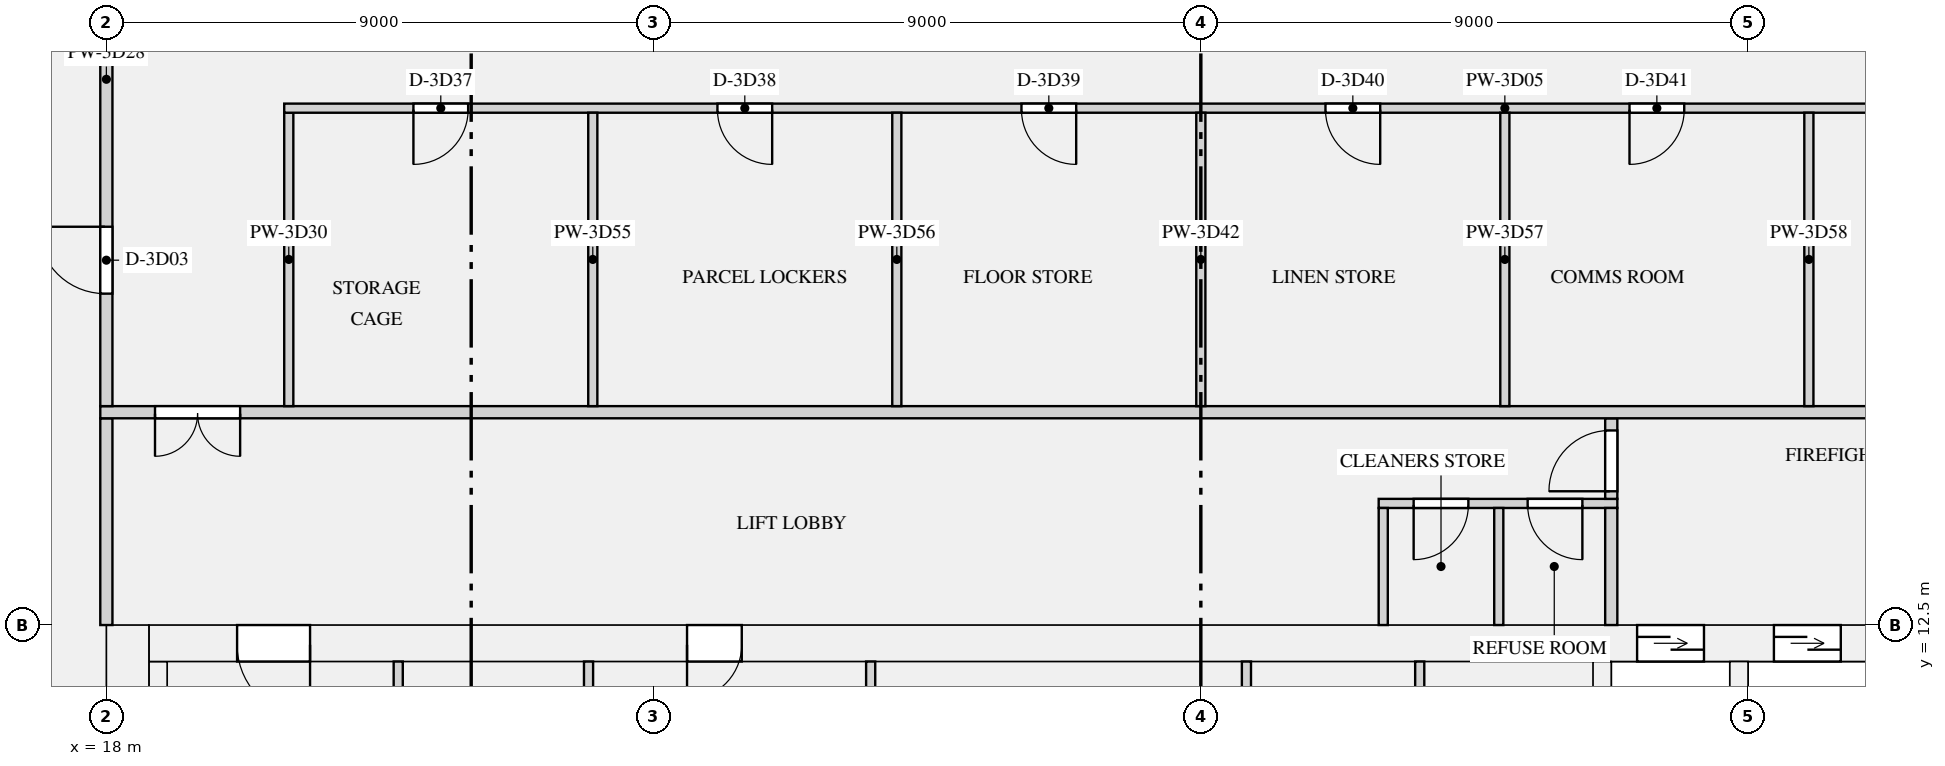
"""IFC4 building model, lengths in metres.
Left out: names, types, materials, properties, quantities, classifications, styles, units other than length and angle.
Written with IfcOpenShell. Run it as: python <this file> out.ifc"""

import sys

from ifc_helpers import new_model, si_unit, direction, frame, frame_2d, origin, place, context, subcontext, project, spatial, rectangle, extrude, element, fill, save


model = new_model("IFC4")
c1 = context("Model", 3, precision=1e-05, world=origin(), true_north=direction((0.0, 1.0)))
c2 = subcontext(c1, "Body", "Model", "MODEL_VIEW")
j1 = project(units=[si_unit("LENGTHUNIT", "METRE"), si_unit("PLANEANGLEUNIT", "RADIAN")], contexts=[c1])
p1 = place(None, origin())
s1 = spatial("IfcSite", under=j1, at=p1, CompositionType="ELEMENT")
p2 = place(p1, origin())
s2 = spatial("IfcBuilding", under=s1, at=p2, CompositionType="ELEMENT")
p3 = place(p2, frame((0.0, 0.0, 166.5)))
s3 = spatial("IfcBuildingStorey", under=s2, at=p3, CompositionType="ELEMENT", Elevation=166.5)
p4 = place(p3, frame((18.35, 0.0, 0.0), z_axis=(0.0, 0.0, 1.0), x_axis=(0.0, 1.0, 0.0)))
e1 = element("IfcWall", 1, at=p4, inside=s3, PredefinedType="SHEAR", context=c2, shape_type="SweptSolid", body=[
    extrude(rectangle(XDim=12.5, YDim=0.7, at=frame_2d((6.25, 0.0))), origin(), (0.0, 0.0, 1.0), 3.15),
])
p5 = place(p3, frame((18.7, 12.2, 0.0), z_axis=(0.0, 0.0, 1.0), x_axis=(1.0, 0.0, 0.0)))
e2 = element("IfcWall", 2, at=p5, inside=s3, PredefinedType="SHEAR", context=c2, shape_type="SweptSolid", body=[
    extrude(rectangle(XDim=34.6, YDim=0.6, at=frame_2d((17.3, 0.0))), origin(), (0.0, 0.0, 1.0), 3.15),
])
p6 = place(p5, frame((24.475, 0.0, 0.0)))
e3 = element("IfcOpeningElement", 3, at=p6, cuts=e2, PredefinedType="OPENING", context=c2, shape_type="SweptSolid", body=[
    extrude(rectangle(XDim=1.1, YDim=2.1, at=frame_2d((0.55, 1.05))), frame((0.0, 0.31, 0.0), z_axis=(0.0, -1.0, 0.0), x_axis=(1.0, 0.0, 0.0)), (0.0, 0.0, 1.0), 0.62),
])
p7 = place(p5, frame((26.725, 0.0, 0.0)))
e4 = element("IfcOpeningElement", 4, at=p7, cuts=e2, PredefinedType="OPENING", context=c2, shape_type="SweptSolid", body=[
    extrude(rectangle(XDim=1.1, YDim=2.1, at=frame_2d((0.55, 1.05))), frame((0.0, 0.31, 0.0), z_axis=(0.0, -1.0, 0.0), x_axis=(1.0, 0.0, 0.0)), (0.0, 0.0, 1.0), 0.62),
])
p8 = place(p5, frame((28.975, 0.0, 0.0)))
e5 = element("IfcOpeningElement", 5, at=p8, cuts=e2, PredefinedType="OPENING", context=c2, shape_type="SweptSolid", body=[
    extrude(rectangle(XDim=1.1, YDim=2.1, at=frame_2d((0.55, 1.05))), frame((0.0, 0.31, 0.0), z_axis=(0.0, -1.0, 0.0), x_axis=(1.0, 0.0, 0.0)), (0.0, 0.0, 1.0), 0.62),
])
p9 = place(p5, frame((8.85, 0.0, 0.0)))
e6 = element("IfcOpeningElement", 6, at=p9, cuts=e2, PredefinedType="OPENING", context=c2, shape_type="SweptSolid", body=[
    extrude(rectangle(XDim=0.9, YDim=2.1, at=frame_2d((0.45, 1.05))), frame((0.0, 0.31, 0.0), z_axis=(0.0, -1.0, 0.0), x_axis=(1.0, 0.0, 0.0)), (0.0, 0.0, 1.0), 0.62),
])
p10 = place(p5, frame((1.45, 0.0, 0.0)))
e7 = element("IfcOpeningElement", 7, at=p10, cuts=e2, PredefinedType="OPENING", context=c2, shape_type="SweptSolid", body=[
    extrude(rectangle(XDim=1.2, YDim=2.1, at=frame_2d((0.6, 1.05))), frame((0.0, 0.31, 0.0), z_axis=(0.0, -1.0, 0.0), x_axis=(1.0, 0.0, 0.0)), (0.0, 0.0, 1.0), 0.62),
])
p11 = place(p5, frame((31.95, 0.0, 0.0)))
e8 = element("IfcOpeningElement", 8, at=p11, cuts=e2, PredefinedType="OPENING", context=c2, shape_type="SweptSolid", body=[
    extrude(rectangle(XDim=1.2, YDim=2.1, at=frame_2d((0.6, 1.05))), frame((0.0, 0.31, 0.0), z_axis=(0.0, -1.0, 0.0), x_axis=(1.0, 0.0, 0.0)), (0.0, 0.0, 1.0), 0.62),
])
p12 = place(p3, frame((18.85, 1.0, 0.0), z_axis=(0.0, 0.0, 1.0), x_axis=(0.0, 1.0, 0.0)))
e9 = element("IfcWall", 9, at=p12, inside=s3, PredefinedType="SHEAR", context=c2, shape_type="SweptSolid", body=[
    extrude(rectangle(XDim=10.9, YDim=0.3, at=frame_2d((5.45, 0.0))), origin(), (0.0, 0.0, 1.0), 3.15),
])
for number, where, z_axis, x_axis in (
    (10, (42.6, 8.25, 0.0), (0.0, 0.0, 1.0), (0.0, 1.0, 0.0)),
    (11, (44.85, 8.25, 0.0), (0.0, 0.0, 1.0), (0.0, 1.0, 0.0)),
):
    element("IfcWall", number, at=place(p3, frame(where, z_axis=z_axis, x_axis=x_axis)), inside=s3, PredefinedType="SHEAR", context=c2, shape_type="SweptSolid", body=[
        extrude(rectangle(XDim=3.65, YDim=0.3, at=frame_2d((1.825, 0.0))), origin(), (0.0, 0.0, 1.0), 3.15),
    ])
p13 = place(p3, frame((38.925, 14.5, 0.0), z_axis=(0.0, 0.0, 1.0), x_axis=(1.0, 0.0, 0.0)))
e12 = element("IfcWall", 12, at=p13, inside=s3, PredefinedType="PARTITIONING", context=c2, shape_type="SweptSolid", body=[
    extrude(rectangle(XDim=3.925, YDim=0.15, at=frame_2d((1.962, 0.0))), origin(), (0.0, 0.0, 1.0), 2.83),
])
p14 = place(p13, frame((0.575, 0.0, 0.0)))
e13 = element("IfcOpeningElement", 13, at=p14, cuts=e12, PredefinedType="OPENING", context=c2, shape_type="SweptSolid", body=[
    extrude(rectangle(XDim=0.9, YDim=2.1, at=frame_2d((0.45, 1.05))), frame((0.0, 0.085, 0.0), z_axis=(0.0, -1.0, 0.0), x_axis=(1.0, 0.0, 0.0)), (0.0, 0.0, 1.0), 0.17),
])
p15 = place(p13, frame((2.45, 0.0, 0.0)))
e14 = element("IfcOpeningElement", 14, at=p15, cuts=e12, PredefinedType="OPENING", context=c2, shape_type="SweptSolid", body=[
    extrude(rectangle(XDim=0.9, YDim=2.1, at=frame_2d((0.45, 1.05))), frame((0.0, 0.085, 0.0), z_axis=(0.0, -1.0, 0.0), x_axis=(1.0, 0.0, 0.0)), (0.0, 0.0, 1.0), 0.17),
])
for number, where, z_axis, x_axis in (
    (15, (22.8, 6.725, 0.0), (0.0, 0.0, 1.0), (0.0, 1.0, 0.0)),
    (16, (36.75, 6.725, 0.0), (0.0, 0.0, 1.0), (0.0, 1.0, 0.0)),
    (17, (39.6, 6.725, 0.0), (0.0, 0.0, 1.0), (0.0, 1.0, 0.0)),
):
    element("IfcWall", number, at=place(p3, frame(where, z_axis=z_axis, x_axis=x_axis)), inside=s3, PredefinedType="PARTITIONING", context=c2, shape_type="SweptSolid", body=[
        extrude(rectangle(XDim=5.175, YDim=0.15, at=frame_2d((2.587, 0.0))), origin(), (0.0, 0.0, 1.0), 2.83),
    ])
for number, where, z_axis, x_axis in (
    (18, (25.93, 9.805, 0.0), (0.0, 0.0, 1.0), (0.0, 1.0, 0.0)),
    (19, (30.57, 9.805, 0.0), (0.0, 0.0, 1.0), (0.0, 1.0, 0.0)),
):
    element("IfcWall", number, at=place(p3, frame(where, z_axis=z_axis, x_axis=x_axis)), inside=s3, PredefinedType="PARTITIONING", context=c2, shape_type="SweptSolid", body=[
        extrude(rectangle(XDim=2.095, YDim=0.15, at=frame_2d((1.047, 0.0))), origin(), (0.0, 0.0, 1.0), 2.83),
    ])
p16 = place(p3, frame((18.0, 12.5, 0.0), z_axis=(0.0, 0.0, 1.0), x_axis=(0.0, 1.0, 0.0)))
e20 = element("IfcWall", 20, at=p16, inside=s3, PredefinedType="PARTITIONING", context=c2, shape_type="SweptSolid", body=[
    extrude(rectangle(XDim=3.4, YDim=0.2, at=frame_2d((1.7, 0.0))), origin(), (0.0, 0.0, 1.0), 2.83),
])
for number, where, z_axis, x_axis in (
    (21, (39.0, 12.5, 0.0), (0.0, 0.0, 1.0), (0.0, 1.0, 0.0)),
    (22, (40.9, 12.5, 0.0), (0.0, 0.0, 1.0), (0.0, 1.0, 0.0)),
):
    element("IfcWall", number, at=place(p3, frame(where, z_axis=z_axis, x_axis=x_axis)), inside=s3, PredefinedType="PARTITIONING", context=c2, shape_type="SweptSolid", body=[
        extrude(rectangle(XDim=1.925, YDim=0.15, at=frame_2d((0.962, 0.0))), origin(), (0.0, 0.0, 1.0), 2.83),
    ])
p17 = place(p3, frame((42.75, 12.5, 0.0), z_axis=(0.0, 0.0, 1.0), x_axis=(0.0, 1.0, 0.0)))
e23 = element("IfcWall", 23, at=p17, inside=s3, PredefinedType="PARTITIONING", context=c2, shape_type="SweptSolid", body=[
    extrude(rectangle(XDim=1.925, YDim=0.2, at=frame_2d((0.962, 0.0))), origin(), (0.0, 0.0, 1.0), 2.83),
])
p18 = place(p3, frame((42.75, 14.575, 0.0), z_axis=(0.0, 0.0, 1.0), x_axis=(0.0, 1.0, 0.0)))
e24 = element("IfcWall", 24, at=p18, inside=s3, PredefinedType="PARTITIONING", context=c2, shape_type="SweptSolid", body=[
    extrude(rectangle(XDim=1.325, YDim=0.2, at=frame_2d((0.663, 0.0))), origin(), (0.0, 0.0, 1.0), 2.83),
])
p19 = place(p18, frame((0.125, 0.0, 0.0)))
e25 = element("IfcOpeningElement", 25, at=p19, cuts=e24, PredefinedType="OPENING", context=c2, shape_type="SweptSolid", body=[
    extrude(rectangle(XDim=1.0, YDim=2.1, at=frame_2d((0.5, 1.05))), frame((0.0, 0.11, 0.0), z_axis=(0.0, -1.0, 0.0), x_axis=(1.0, 0.0, 0.0)), (0.0, 0.0, 1.0), 0.22),
])
p20 = place(p3, frame((20.925, 21.0, 0.0), z_axis=(0.0, 0.0, 1.0), x_axis=(1.0, 0.0, 0.0)))
e26 = element("IfcWall", 26, at=p20, inside=s3, PredefinedType="PARTITIONING", context=c2, shape_type="SweptSolid", body=[
    extrude(rectangle(XDim=30.15, YDim=0.15, at=frame_2d((15.075, 0.0))), origin(), (0.0, 0.0, 1.0), 2.83),
])
p21 = place(p20, frame((2.125, 0.0, 0.0)))
e27 = element("IfcOpeningElement", 27, at=p21, cuts=e26, PredefinedType="OPENING", context=c2, shape_type="SweptSolid", body=[
    extrude(rectangle(XDim=0.9, YDim=2.1, at=frame_2d((0.45, 1.05))), frame((0.0, 0.085, 0.0), z_axis=(0.0, -1.0, 0.0), x_axis=(1.0, 0.0, 0.0)), (0.0, 0.0, 1.0), 0.17),
])
p22 = place(p20, frame((7.125, 0.0, 0.0)))
e28 = element("IfcOpeningElement", 28, at=p22, cuts=e26, PredefinedType="OPENING", context=c2, shape_type="SweptSolid", body=[
    extrude(rectangle(XDim=0.9, YDim=2.1, at=frame_2d((0.45, 1.05))), frame((0.0, 0.085, 0.0), z_axis=(0.0, -1.0, 0.0), x_axis=(1.0, 0.0, 0.0)), (0.0, 0.0, 1.0), 0.17),
])
p23 = place(p20, frame((12.125, 0.0, 0.0)))
e29 = element("IfcOpeningElement", 29, at=p23, cuts=e26, PredefinedType="OPENING", context=c2, shape_type="SweptSolid", body=[
    extrude(rectangle(XDim=0.9, YDim=2.1, at=frame_2d((0.45, 1.05))), frame((0.0, 0.085, 0.0), z_axis=(0.0, -1.0, 0.0), x_axis=(1.0, 0.0, 0.0)), (0.0, 0.0, 1.0), 0.17),
])
p24 = place(p20, frame((17.125, 0.0, 0.0)))
e30 = element("IfcOpeningElement", 30, at=p24, cuts=e26, PredefinedType="OPENING", context=c2, shape_type="SweptSolid", body=[
    extrude(rectangle(XDim=0.9, YDim=2.1, at=frame_2d((0.45, 1.05))), frame((0.0, 0.085, 0.0), z_axis=(0.0, -1.0, 0.0), x_axis=(1.0, 0.0, 0.0)), (0.0, 0.0, 1.0), 0.17),
])
p25 = place(p20, frame((22.125, 0.0, 0.0)))
e31 = element("IfcOpeningElement", 31, at=p25, cuts=e26, PredefinedType="OPENING", context=c2, shape_type="SweptSolid", body=[
    extrude(rectangle(XDim=0.9, YDim=2.1, at=frame_2d((0.45, 1.05))), frame((0.0, 0.085, 0.0), z_axis=(0.0, -1.0, 0.0), x_axis=(1.0, 0.0, 0.0)), (0.0, 0.0, 1.0), 0.17),
])
p26 = place(p20, frame((27.125, 0.0, 0.0)))
e32 = element("IfcOpeningElement", 32, at=p26, cuts=e26, PredefinedType="OPENING", context=c2, shape_type="SweptSolid", body=[
    extrude(rectangle(XDim=0.9, YDim=2.1, at=frame_2d((0.45, 1.05))), frame((0.0, 0.085, 0.0), z_axis=(0.0, -1.0, 0.0), x_axis=(1.0, 0.0, 0.0)), (0.0, 0.0, 1.0), 0.17),
])
p27 = place(p3, frame((17.9, 16.0, 0.0), z_axis=(0.0, 0.0, 1.0), x_axis=(1.0, 0.0, 0.0)))
e33 = element("IfcWall", 33, at=p27, inside=s3, PredefinedType="PARTITIONING", context=c2, shape_type="SweptSolid", body=[
    extrude(rectangle(XDim=36.2, YDim=0.2, at=frame_2d((18.1, 0.0))), origin(), (0.0, 0.0, 1.0), 2.83),
])
p28 = place(p27, frame((0.9, 0.0, 0.0)))
e34 = element("IfcOpeningElement", 34, at=p28, cuts=e33, PredefinedType="OPENING", context=c2, shape_type="SweptSolid", body=[
    extrude(rectangle(XDim=1.4, YDim=2.1, at=frame_2d((0.7, 1.05))), frame((0.0, 0.11, 0.0), z_axis=(0.0, -1.0, 0.0), x_axis=(1.0, 0.0, 0.0)), (0.0, 0.0, 1.0), 0.22),
])
p29 = place(p27, frame((33.9, 0.0, 0.0)))
e35 = element("IfcOpeningElement", 35, at=p29, cuts=e33, PredefinedType="OPENING", context=c2, shape_type="SweptSolid", body=[
    extrude(rectangle(XDim=1.4, YDim=2.1, at=frame_2d((0.7, 1.05))), frame((0.0, 0.11, 0.0), z_axis=(0.0, -1.0, 0.0), x_axis=(1.0, 0.0, 0.0)), (0.0, 0.0, 1.0), 0.22),
])
p30 = place(p3, frame((18.0, 16.1, 0.0), z_axis=(0.0, 0.0, 1.0), x_axis=(0.0, 1.0, 0.0)))
e36 = element("IfcWall", 36, at=p30, inside=s3, PredefinedType="PARTITIONING", context=c2, shape_type="SweptSolid", body=[
    extrude(rectangle(XDim=7.8, YDim=0.2, at=frame_2d((3.9, 0.0))), origin(), (0.0, 0.0, 1.0), 2.83),
])
p31 = place(p30, frame((1.85, 0.0, 0.0)))
e37 = element("IfcOpeningElement", 37, at=p31, cuts=e36, PredefinedType="OPENING", context=c2, shape_type="SweptSolid", body=[
    extrude(rectangle(XDim=1.1, YDim=2.1, at=frame_2d((0.55, 1.05))), frame((0.0, 0.11, 0.0), z_axis=(0.0, -1.0, 0.0), x_axis=(1.0, 0.0, 0.0)), (0.0, 0.0, 1.0), 0.22),
])
for number, where, z_axis, x_axis in (
    (38, (21.0, 16.1, 0.0), (0.0, 0.0, 1.0), (0.0, 1.0, 0.0)),
    (39, (36.0, 16.1, 0.0), (0.0, 0.0, 1.0), (0.0, 1.0, 0.0)),
    (40, (26.0, 16.1, 0.0), (0.0, 0.0, 1.0), (0.0, 1.0, 0.0)),
    (41, (31.0, 16.1, 0.0), (0.0, 0.0, 1.0), (0.0, 1.0, 0.0)),
    (42, (41.0, 16.1, 0.0), (0.0, 0.0, 1.0), (0.0, 1.0, 0.0)),
    (43, (46.0, 16.1, 0.0), (0.0, 0.0, 1.0), (0.0, 1.0, 0.0)),
):
    element("IfcWall", number, at=place(p3, frame(where, z_axis=z_axis, x_axis=x_axis)), inside=s3, PredefinedType="PARTITIONING", context=c2, shape_type="SweptSolid", body=[
        extrude(rectangle(XDim=4.825, YDim=0.15, at=frame_2d((2.413, 0.0))), origin(), (0.0, 0.0, 1.0), 2.83),
    ])
p32 = place(p6, origin())
e44 = element("IfcDoor", 44, at=p32, inside=s3, OperationType="DOUBLE_DOOR_SLIDING", PredefinedType="DOOR", context=c2, shape_type="SweptSolid", body=[
    extrude(rectangle(XDim=1.1, YDim=2.1, at=frame_2d((0.55, 1.05))), frame((0.0, 0.025, 0.0), z_axis=(0.0, -1.0, 0.0), x_axis=(1.0, 0.0, 0.0)), (0.0, 0.0, 1.0), 0.05),
])
fill(e3, e44)
p33 = place(p7, origin())
e45 = element("IfcDoor", 45, at=p33, inside=s3, OperationType="DOUBLE_DOOR_SLIDING", PredefinedType="DOOR", context=c2, shape_type="SweptSolid", body=[
    extrude(rectangle(XDim=1.1, YDim=2.1, at=frame_2d((0.55, 1.05))), frame((0.0, 0.025, 0.0), z_axis=(0.0, -1.0, 0.0), x_axis=(1.0, 0.0, 0.0)), (0.0, 0.0, 1.0), 0.05),
])
fill(e4, e45)
p34 = place(p14, frame((0.9, 0.0, 0.0), z_axis=(0.0, 0.0, 1.0), x_axis=(-1.0, 0.0, 0.0)))
e46 = element("IfcDoor", 46, at=p34, inside=s3, OperationType="SINGLE_SWING_RIGHT", PredefinedType="DOOR", context=c2, shape_type="SweptSolid", body=[
    extrude(rectangle(XDim=0.9, YDim=2.1, at=frame_2d((0.45, 1.05))), frame((0.0, 0.025, 0.0), z_axis=(0.0, -1.0, 0.0), x_axis=(1.0, 0.0, 0.0)), (0.0, 0.0, 1.0), 0.05),
])
fill(e13, e46)
p35 = place(p15, frame((0.9, 0.0, 0.0), z_axis=(0.0, 0.0, 1.0), x_axis=(-1.0, 0.0, 0.0)))
e47 = element("IfcDoor", 47, at=p35, inside=s3, OperationType="SINGLE_SWING_LEFT", PredefinedType="DOOR", context=c2, shape_type="SweptSolid", body=[
    extrude(rectangle(XDim=0.9, YDim=2.1, at=frame_2d((0.45, 1.05))), frame((0.0, 0.025, 0.0), z_axis=(0.0, -1.0, 0.0), x_axis=(1.0, 0.0, 0.0)), (0.0, 0.0, 1.0), 0.05),
])
fill(e14, e47)
p36 = place(p9, frame((0.9, 0.0, 0.0), z_axis=(0.0, 0.0, 1.0), x_axis=(-1.0, 0.0, 0.0)))
e48 = element("IfcDoor", 48, at=p36, inside=s3, OperationType="SINGLE_SWING_RIGHT", PredefinedType="DOOR", context=c2, shape_type="SweptSolid", body=[
    extrude(rectangle(XDim=0.9, YDim=2.1, at=frame_2d((0.45, 1.05))), frame((0.0, 0.025, 0.0), z_axis=(0.0, -1.0, 0.0), x_axis=(1.0, 0.0, 0.0)), (0.0, 0.0, 1.0), 0.05),
])
fill(e6, e48)
p37 = place(p10, frame((1.2, 0.0, 0.0), z_axis=(0.0, 0.0, 1.0), x_axis=(-1.0, 0.0, 0.0)))
e49 = element("IfcDoor", 49, at=p37, inside=s3, OperationType="SINGLE_SWING_LEFT", PredefinedType="DOOR", context=c2, shape_type="SweptSolid", body=[
    extrude(rectangle(XDim=1.2, YDim=2.1, at=frame_2d((0.6, 1.05))), frame((0.0, 0.025, 0.0), z_axis=(0.0, -1.0, 0.0), x_axis=(1.0, 0.0, 0.0)), (0.0, 0.0, 1.0), 0.05),
])
fill(e7, e49)
p38 = place(p19, origin())
e50 = element("IfcDoor", 50, at=p38, inside=s3, OperationType="SINGLE_SWING_LEFT", PredefinedType="DOOR", context=c2, shape_type="SweptSolid", body=[
    extrude(rectangle(XDim=1.0, YDim=2.1, at=frame_2d((0.5, 1.05))), frame((0.0, 0.025, 0.0), z_axis=(0.0, -1.0, 0.0), x_axis=(1.0, 0.0, 0.0)), (0.0, 0.0, 1.0), 0.05),
])
fill(e25, e50)
p39 = place(p28, frame((1.4, 0.0, 0.0), z_axis=(0.0, 0.0, 1.0), x_axis=(-1.0, 0.0, 0.0)))
e51 = element("IfcDoor", 51, at=p39, inside=s3, OperationType="DOUBLE_DOOR_SINGLE_SWING", PredefinedType="DOOR", context=c2, shape_type="SweptSolid", body=[
    extrude(rectangle(XDim=1.4, YDim=2.1, at=frame_2d((0.7, 1.05))), frame((0.0, 0.025, 0.0), z_axis=(0.0, -1.0, 0.0), x_axis=(1.0, 0.0, 0.0)), (0.0, 0.0, 1.0), 0.05),
])
fill(e34, e51)
p40 = place(p31, origin())
e52 = element("IfcDoor", 52, at=p40, inside=s3, OperationType="SINGLE_SWING_RIGHT", PredefinedType="DOOR", context=c2, shape_type="SweptSolid", body=[
    extrude(rectangle(XDim=1.1, YDim=2.1, at=frame_2d((0.55, 1.05))), frame((0.0, 0.025, 0.0), z_axis=(0.0, -1.0, 0.0), x_axis=(1.0, 0.0, 0.0)), (0.0, 0.0, 1.0), 0.05),
])
fill(e37, e52)
p41 = place(p21, frame((0.9, 0.0, 0.0), z_axis=(0.0, 0.0, 1.0), x_axis=(-1.0, 0.0, 0.0)))
e53 = element("IfcDoor", 53, at=p41, inside=s3, OperationType="SINGLE_SWING_RIGHT", PredefinedType="DOOR", context=c2, shape_type="SweptSolid", body=[
    extrude(rectangle(XDim=0.9, YDim=2.1, at=frame_2d((0.45, 1.05))), frame((0.0, 0.025, 0.0), z_axis=(0.0, -1.0, 0.0), x_axis=(1.0, 0.0, 0.0)), (0.0, 0.0, 1.0), 0.05),
])
fill(e27, e53)
p42 = place(p22, frame((0.9, 0.0, 0.0), z_axis=(0.0, 0.0, 1.0), x_axis=(-1.0, 0.0, 0.0)))
e54 = element("IfcDoor", 54, at=p42, inside=s3, OperationType="SINGLE_SWING_LEFT", PredefinedType="DOOR", context=c2, shape_type="SweptSolid", body=[
    extrude(rectangle(XDim=0.9, YDim=2.1, at=frame_2d((0.45, 1.05))), frame((0.0, 0.025, 0.0), z_axis=(0.0, -1.0, 0.0), x_axis=(1.0, 0.0, 0.0)), (0.0, 0.0, 1.0), 0.05),
])
fill(e28, e54)
p43 = place(p23, frame((0.9, 0.0, 0.0), z_axis=(0.0, 0.0, 1.0), x_axis=(-1.0, 0.0, 0.0)))
e55 = element("IfcDoor", 55, at=p43, inside=s3, OperationType="SINGLE_SWING_LEFT", PredefinedType="DOOR", context=c2, shape_type="SweptSolid", body=[
    extrude(rectangle(XDim=0.9, YDim=2.1, at=frame_2d((0.45, 1.05))), frame((0.0, 0.025, 0.0), z_axis=(0.0, -1.0, 0.0), x_axis=(1.0, 0.0, 0.0)), (0.0, 0.0, 1.0), 0.05),
])
fill(e29, e55)
p44 = place(p24, frame((0.9, 0.0, 0.0), z_axis=(0.0, 0.0, 1.0), x_axis=(-1.0, 0.0, 0.0)))
e56 = element("IfcDoor", 56, at=p44, inside=s3, OperationType="SINGLE_SWING_LEFT", PredefinedType="DOOR", context=c2, shape_type="SweptSolid", body=[
    extrude(rectangle(XDim=0.9, YDim=2.1, at=frame_2d((0.45, 1.05))), frame((0.0, 0.025, 0.0), z_axis=(0.0, -1.0, 0.0), x_axis=(1.0, 0.0, 0.0)), (0.0, 0.0, 1.0), 0.05),
])
fill(e30, e56)
p45 = place(p25, frame((0.9, 0.0, 0.0), z_axis=(0.0, 0.0, 1.0), x_axis=(-1.0, 0.0, 0.0)))
e57 = element("IfcDoor", 57, at=p45, inside=s3, OperationType="SINGLE_SWING_RIGHT", PredefinedType="DOOR", context=c2, shape_type="SweptSolid", body=[
    extrude(rectangle(XDim=0.9, YDim=2.1, at=frame_2d((0.45, 1.05))), frame((0.0, 0.025, 0.0), z_axis=(0.0, -1.0, 0.0), x_axis=(1.0, 0.0, 0.0)), (0.0, 0.0, 1.0), 0.05),
])
fill(e31, e57)
save(model, sys.argv[1])
